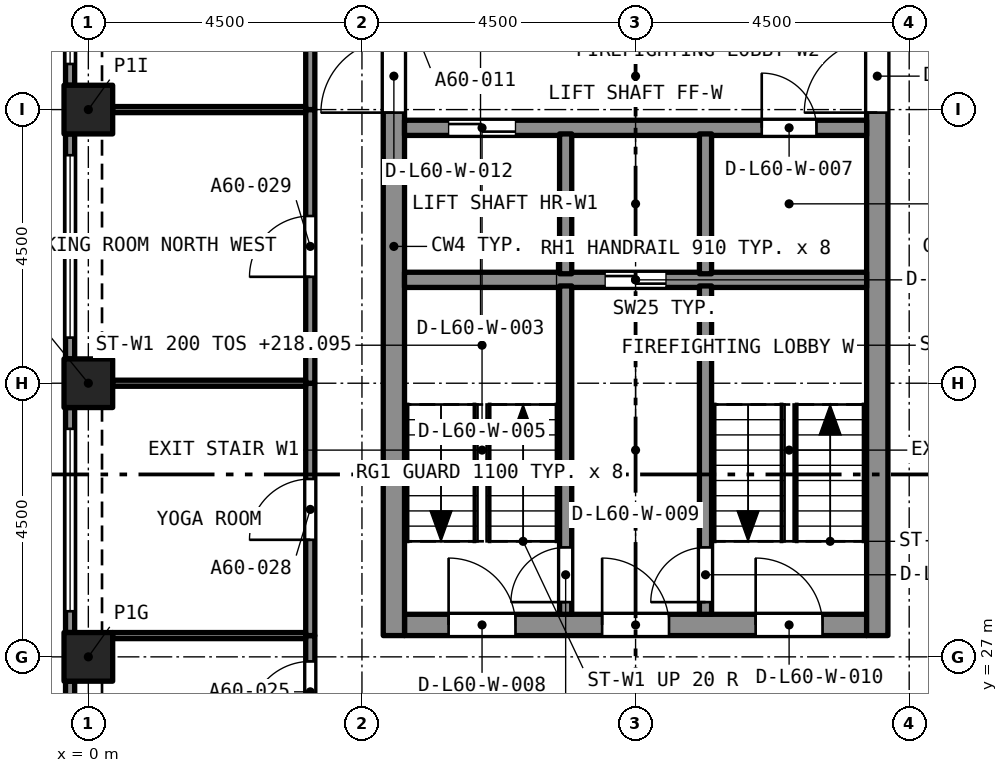
"""IFC4 building model, lengths in metres.
Left out: names, types, materials, properties, quantities, classifications, styles, units other than length and angle.
Written with IfcOpenShell. Run it as: python <this file> out.ifc"""

import sys

from ifc_helpers import new_model, si_unit, direction, frame, frame_2d, origin, origin_2d, place, context, subcontext, project, spatial, rectangle, extrude, element, fill, save


model = new_model("IFC4")
c1 = context("Model", 3, precision=1e-05, world=origin(), true_north=direction((0.0, 1.0)))
c2 = subcontext(c1, "Body", "Model", "MODEL_VIEW")
j1 = project(units=[si_unit("LENGTHUNIT", "METRE"), si_unit("PLANEANGLEUNIT", "RADIAN")], contexts=[c1])
p1 = place(None, origin())
s1 = spatial("IfcSite", under=j1, at=p1, CompositionType="ELEMENT")
p2 = place(p1, origin())
s2 = spatial("IfcBuilding", under=s1, at=p2, CompositionType="ELEMENT")
p3 = place(p2, frame((0.0, 0.0, 216.495)))
s3 = spatial("IfcBuildingStorey", under=s2, at=p3, CompositionType="ELEMENT", Elevation=216.495)
for number, where, z_axis, x_axis in (
    (1, (0.0, 27.0, 0.0), (0.0, 0.0, 1.0), (1.0, 0.0, 0.0)),
    (2, (0.0, 31.5, 0.0), (0.0, 0.0, 1.0), (1.0, 0.0, 0.0)),
    (3, (0.0, 36.0, 0.0), (0.0, 0.0, 1.0), (1.0, 0.0, 0.0)),
):
    element("IfcColumn", number, at=place(p3, frame(where, z_axis=z_axis, x_axis=x_axis)), inside=s3, PredefinedType="COLUMN", context=c2, shape_type="SweptSolid", body=[
        extrude(rectangle(XDim=0.8, YDim=0.8, at=origin_2d()), origin(), (0.0, 0.0, 1.0), 3.2),
    ])
p4 = place(p3, frame((5.2, 27.525, 0.0), z_axis=(0.0, 0.0, 1.0), x_axis=(1.0, 0.0, 0.0)))
e4 = element("IfcWall", 4, at=p4, inside=s3, PredefinedType="SOLIDWALL", context=c2, shape_type="SweptSolid", body=[
    extrude(rectangle(XDim=7.6, YDim=0.35, at=frame_2d((3.8, 0.0))), origin(), (0.0, 0.0, 1.0), 3.2),
])
p5 = place(p4, frame((0.725, 0.0, 0.0)))
e5 = element("IfcOpeningElement", 5, at=p5, cuts=e4, PredefinedType="OPENING", context=c2, shape_type="SweptSolid", body=[
    extrude(rectangle(XDim=1.1, YDim=2.1, at=frame_2d((0.55, 1.05))), frame((0.0, 0.185, 0.0), z_axis=(0.0, -1.0, 0.0), x_axis=(1.0, 0.0, 0.0)), (0.0, 0.0, 1.0), 0.37),
])
p6 = place(p4, frame((3.25, 0.0, 0.0)))
e6 = element("IfcOpeningElement", 6, at=p6, cuts=e4, PredefinedType="OPENING", context=c2, shape_type="SweptSolid", body=[
    extrude(rectangle(XDim=1.1, YDim=2.1, at=frame_2d((0.55, 1.05))), frame((0.0, 0.185, 0.0), z_axis=(0.0, -1.0, 0.0), x_axis=(1.0, 0.0, 0.0)), (0.0, 0.0, 1.0), 0.37),
])
p7 = place(p4, frame((5.775, 0.0, 0.0)))
e7 = element("IfcOpeningElement", 7, at=p7, cuts=e4, PredefinedType="OPENING", context=c2, shape_type="SweptSolid", body=[
    extrude(rectangle(XDim=1.1, YDim=2.1, at=frame_2d((0.55, 1.05))), frame((0.0, 0.185, 0.0), z_axis=(0.0, -1.0, 0.0), x_axis=(1.0, 0.0, 0.0)), (0.0, 0.0, 1.0), 0.37),
])
p8 = place(p3, frame((5.025, 27.35, 0.0), z_axis=(0.0, 0.0, 1.0), x_axis=(0.0, 1.0, 0.0)))
e8 = element("IfcWall", 8, at=p8, inside=s3, PredefinedType="SOLIDWALL", context=c2, shape_type="SweptSolid", body=[
    extrude(rectangle(XDim=12.8, YDim=0.35, at=frame_2d((6.4, 0.0))), origin(), (0.0, 0.0, 1.0), 3.2),
])
p9 = place(p8, frame((8.6, 0.0, 0.0)))
e9 = element("IfcOpeningElement", 9, at=p9, cuts=e8, PredefinedType="OPENING", context=c2, shape_type="SweptSolid", body=[
    extrude(rectangle(XDim=1.2, YDim=2.1, at=frame_2d((0.6, 1.05))), frame((0.0, 0.185, 0.0), z_axis=(0.0, -1.0, 0.0), x_axis=(1.0, 0.0, 0.0)), (0.0, 0.0, 1.0), 0.37),
])
p10 = place(p3, frame((12.975, 27.35, 0.0), z_axis=(0.0, 0.0, 1.0), x_axis=(0.0, 1.0, 0.0)))
e10 = element("IfcWall", 10, at=p10, inside=s3, PredefinedType="SOLIDWALL", context=c2, shape_type="SweptSolid", body=[
    extrude(rectangle(XDim=12.8, YDim=0.35, at=frame_2d((6.4, 0.0))), origin(), (0.0, 0.0, 1.0), 3.2),
])
p11 = place(p10, frame((10.75, 0.0, 0.0)))
e11 = element("IfcOpeningElement", 11, at=p11, cuts=e10, PredefinedType="OPENING", context=c2, shape_type="SweptSolid", body=[
    extrude(rectangle(XDim=1.1, YDim=2.1, at=frame_2d((0.55, 1.05))), frame((0.0, 0.185, 0.0), z_axis=(0.0, -1.0, 0.0), x_axis=(1.0, 0.0, 0.0)), (0.0, 0.0, 1.0), 0.37),
])
p12 = place(p10, frame((8.6, 0.0, 0.0)))
e12 = element("IfcOpeningElement", 12, at=p12, cuts=e10, PredefinedType="OPENING", context=c2, shape_type="SweptSolid", body=[
    extrude(rectangle(XDim=1.2, YDim=2.1, at=frame_2d((0.6, 1.05))), frame((0.0, 0.185, 0.0), z_axis=(0.0, -1.0, 0.0), x_axis=(1.0, 0.0, 0.0)), (0.0, 0.0, 1.0), 0.37),
])
p13 = place(p3, frame((-0.3, 36.4, 0.0), z_axis=(0.0, 0.0, 1.0), x_axis=(0.0, 1.0, 0.0)))
e13 = element("IfcWall", 13, at=p13, inside=s3, PredefinedType="SOLIDWALL", context=c2, shape_type="SweptSolid", body=[
    extrude(rectangle(XDim=3.7, YDim=0.15, at=frame_2d((1.85, 0.0))), origin(), (0.0, 0.0, 1.0), 3.2),
])
p14 = place(p13, frame((0.35, 0.0, 0.45)))
e14 = element("IfcOpeningElement", 14, at=p14, cuts=e13, PredefinedType="OPENING", context=c2, shape_type="SweptSolid", body=[
    extrude(rectangle(XDim=3.0, YDim=1.95, at=frame_2d((1.5, 0.975))), frame((0.0, 0.085, 0.0), z_axis=(0.0, -1.0, 0.0), x_axis=(1.0, 0.0, 0.0)), (0.0, 0.0, 1.0), 0.17),
])
p15 = place(p3, frame((-0.3, 31.9, 0.0), z_axis=(0.0, 0.0, 1.0), x_axis=(0.0, 1.0, 0.0)))
e15 = element("IfcWall", 15, at=p15, inside=s3, PredefinedType="SOLIDWALL", context=c2, shape_type="SweptSolid", body=[
    extrude(rectangle(XDim=3.7, YDim=0.15, at=frame_2d((1.85, 0.0))), origin(), (0.0, 0.0, 1.0), 3.2),
])
p16 = place(p15, frame((0.35, 0.0, 0.45)))
e16 = element("IfcOpeningElement", 16, at=p16, cuts=e15, PredefinedType="OPENING", context=c2, shape_type="SweptSolid", body=[
    extrude(rectangle(XDim=3.0, YDim=1.95, at=frame_2d((1.5, 0.975))), frame((0.0, 0.085, 0.0), z_axis=(0.0, -1.0, 0.0), x_axis=(1.0, 0.0, 0.0)), (0.0, 0.0, 1.0), 0.17),
])
p17 = place(p3, frame((-0.3, 27.4, 0.0), z_axis=(0.0, 0.0, 1.0), x_axis=(0.0, 1.0, 0.0)))
e17 = element("IfcWall", 17, at=p17, inside=s3, PredefinedType="SOLIDWALL", context=c2, shape_type="SweptSolid", body=[
    extrude(rectangle(XDim=3.7, YDim=0.15, at=frame_2d((1.85, 0.0))), origin(), (0.0, 0.0, 1.0), 3.2),
])
p18 = place(p17, frame((0.35, 0.0, 0.45)))
e18 = element("IfcOpeningElement", 18, at=p18, cuts=e17, PredefinedType="OPENING", context=c2, shape_type="SweptSolid", body=[
    extrude(rectangle(XDim=3.0, YDim=1.95, at=frame_2d((1.5, 0.975))), frame((0.0, 0.085, 0.0), z_axis=(0.0, -1.0, 0.0), x_axis=(1.0, 0.0, 0.0)), (0.0, 0.0, 1.0), 0.17),
])
p19 = place(p3, frame((-0.3, 22.9, 0.0), z_axis=(0.0, 0.0, 1.0), x_axis=(0.0, 1.0, 0.0)))
e19 = element("IfcWall", 19, at=p19, inside=s3, PredefinedType="SOLIDWALL", context=c2, shape_type="SweptSolid", body=[
    extrude(rectangle(XDim=3.7, YDim=0.15, at=frame_2d((1.85, 0.0))), origin(), (0.0, 0.0, 1.0), 3.2),
])
p20 = place(p19, frame((0.35, 0.0, 0.45)))
e20 = element("IfcOpeningElement", 20, at=p20, cuts=e19, PredefinedType="OPENING", context=c2, shape_type="SweptSolid", body=[
    extrude(rectangle(XDim=3.0, YDim=1.95, at=frame_2d((1.5, 0.975))), frame((0.0, 0.085, 0.0), z_axis=(0.0, -1.0, 0.0), x_axis=(1.0, 0.0, 0.0)), (0.0, 0.0, 1.0), 0.17),
])
p21 = place(p3, frame((3.65, 25.425, 0.0), z_axis=(0.0, 0.0, 1.0), x_axis=(0.0, 1.0, 0.0)))
e21 = element("IfcWall", 21, at=p21, inside=s3, PredefinedType="PARTITIONING", context=c2, shape_type="SweptSolid", body=[
    extrude(rectangle(XDim=1.925, YDim=0.15, at=frame_2d((0.962, 0.0))), origin(), (0.0, 0.0, 1.0), 2.9),
])
p22 = place(p21, frame((0.5, 0.0, 0.0)))
e22 = element("IfcOpeningElement", 22, at=p22, cuts=e21, PredefinedType="OPENING", context=c2, shape_type="SweptSolid", body=[
    extrude(rectangle(XDim=1.0, YDim=2.1, at=frame_2d((0.5, 1.05))), frame((0.0, 0.085, 0.0), z_axis=(0.0, -1.0, 0.0), x_axis=(1.0, 0.0, 0.0)), (0.0, 0.0, 1.0), 0.17),
])
p23 = place(p3, frame((3.65, 27.35, 0.0), z_axis=(0.0, 0.0, 1.0), x_axis=(0.0, 1.0, 0.0)))
e23 = element("IfcWall", 23, at=p23, inside=s3, PredefinedType="PARTITIONING", context=c2, shape_type="SweptSolid", body=[
    extrude(rectangle(XDim=4.15, YDim=0.15, at=frame_2d((2.075, 0.0))), origin(), (0.0, 0.0, 1.0), 2.9),
])
p24 = place(p23, frame((1.575, 0.0, 0.0)))
e24 = element("IfcOpeningElement", 24, at=p24, cuts=e23, PredefinedType="OPENING", context=c2, shape_type="SweptSolid", body=[
    extrude(rectangle(XDim=1.0, YDim=2.1, at=frame_2d((0.5, 1.05))), frame((0.0, 0.085, 0.0), z_axis=(0.0, -1.0, 0.0), x_axis=(1.0, 0.0, 0.0)), (0.0, 0.0, 1.0), 0.17),
])
p25 = place(p3, frame((3.65, 31.5, 0.0), z_axis=(0.0, 0.0, 1.0), x_axis=(0.0, 1.0, 0.0)))
e25 = element("IfcWall", 25, at=p25, inside=s3, PredefinedType="PARTITIONING", context=c2, shape_type="SweptSolid", body=[
    extrude(rectangle(XDim=4.5, YDim=0.15, at=frame_2d((2.25, 0.0))), origin(), (0.0, 0.0, 1.0), 2.9),
])
p26 = place(p25, frame((1.75, 0.0, 0.0)))
e26 = element("IfcOpeningElement", 26, at=p26, cuts=e25, PredefinedType="OPENING", context=c2, shape_type="SweptSolid", body=[
    extrude(rectangle(XDim=1.0, YDim=2.1, at=frame_2d((0.5, 1.05))), frame((0.0, 0.085, 0.0), z_axis=(0.0, -1.0, 0.0), x_axis=(1.0, 0.0, 0.0)), (0.0, 0.0, 1.0), 0.17),
])
p27 = place(p3, frame((3.65, 36.0, 0.0), z_axis=(0.0, 0.0, 1.0), x_axis=(0.0, 1.0, 0.0)))
e27 = element("IfcWall", 27, at=p27, inside=s3, PredefinedType="PARTITIONING", context=c2, shape_type="SweptSolid", body=[
    extrude(rectangle(XDim=4.025, YDim=0.15, at=frame_2d((2.012, 0.0))), origin(), (0.0, 0.0, 1.0), 2.9),
])
p28 = place(p27, frame((1.575, 0.0, 0.0)))
e28 = element("IfcOpeningElement", 28, at=p28, cuts=e27, PredefinedType="OPENING", context=c2, shape_type="SweptSolid", body=[
    extrude(rectangle(XDim=1.0, YDim=2.1, at=frame_2d((0.5, 1.05))), frame((0.0, 0.085, 0.0), z_axis=(0.0, -1.0, 0.0), x_axis=(1.0, 0.0, 0.0)), (0.0, 0.0, 1.0), 0.17),
])
for number, where, z_axis, x_axis in (
    (29, (0.4, 27.35, 0.0), (0.0, 0.0, 1.0), (1.0, 0.0, 0.0)),
    (30, (0.4, 31.5, 0.0), (0.0, 0.0, 1.0), (1.0, 0.0, 0.0)),
    (31, (0.4, 36.0, 0.0), (0.0, 0.0, 1.0), (1.0, 0.0, 0.0)),
):
    element("IfcWall", number, at=place(p3, frame(where, z_axis=z_axis, x_axis=x_axis)), inside=s3, PredefinedType="PARTITIONING", context=c2, shape_type="SweptSolid", body=[
        extrude(rectangle(XDim=3.175, YDim=0.1, at=frame_2d((1.587, 0.0))), origin(), (0.0, 0.0, 1.0), 2.9),
    ])
p29 = place(p3, frame((5.2, 33.2, 0.0), z_axis=(0.0, 0.0, 1.0), x_axis=(1.0, 0.0, 0.0)))
e32 = element("IfcWall", 32, at=p29, inside=s3, PredefinedType="SOLIDWALL", context=c2, shape_type="SweptSolid", body=[
    extrude(rectangle(XDim=7.6, YDim=0.25, at=frame_2d((3.8, 0.0))), origin(), (0.0, 0.0, 1.0), 2.9),
])
p30 = place(p29, frame((3.3, 0.0, 0.0)))
e33 = element("IfcOpeningElement", 33, at=p30, cuts=e32, PredefinedType="OPENING", context=c2, shape_type="SweptSolid", body=[
    extrude(rectangle(XDim=1.0, YDim=2.1, at=frame_2d((0.5, 1.05))), frame((0.0, 0.135, 0.0), z_axis=(0.0, -1.0, 0.0), x_axis=(1.0, 0.0, 0.0)), (0.0, 0.0, 1.0), 0.27),
])
p31 = place(p3, frame((5.2, 35.7, 0.0), z_axis=(0.0, 0.0, 1.0), x_axis=(1.0, 0.0, 0.0)))
e34 = element("IfcWall", 34, at=p31, inside=s3, PredefinedType="SOLIDWALL", context=c2, shape_type="SweptSolid", body=[
    extrude(rectangle(XDim=7.6, YDim=0.25, at=frame_2d((3.8, 0.0))), origin(), (0.0, 0.0, 1.0), 2.9),
])
p32 = place(p31, frame((0.725, 0.0, 0.0)))
e35 = element("IfcOpeningElement", 35, at=p32, cuts=e34, PredefinedType="OPENING", context=c2, shape_type="SweptSolid", body=[
    extrude(rectangle(XDim=1.1, YDim=2.4, at=frame_2d((0.55, 1.2))), frame((0.0, 0.135, 0.0), z_axis=(0.0, -1.0, 0.0), x_axis=(1.0, 0.0, 0.0)), (0.0, 0.0, 1.0), 0.27),
])
p33 = place(p31, frame((5.875, 0.0, 0.0)))
e36 = element("IfcOpeningElement", 36, at=p33, cuts=e34, PredefinedType="OPENING", context=c2, shape_type="SweptSolid", body=[
    extrude(rectangle(XDim=0.9, YDim=2.1, at=frame_2d((0.45, 1.05))), frame((0.0, 0.135, 0.0), z_axis=(0.0, -1.0, 0.0), x_axis=(1.0, 0.0, 0.0)), (0.0, 0.0, 1.0), 0.27),
])
p34 = place(p3, frame((7.85, 27.7, 0.0), z_axis=(0.0, 0.0, 1.0), x_axis=(0.0, 1.0, 0.0)))
e37 = element("IfcWall", 37, at=p34, inside=s3, PredefinedType="SOLIDWALL", context=c2, shape_type="SweptSolid", body=[
    extrude(rectangle(XDim=5.4, YDim=0.2, at=frame_2d((2.7, 0.0))), origin(), (0.0, 0.0, 1.0), 2.9),
])
p35 = place(p34, frame((0.2, 0.0, 0.0)))
e38 = element("IfcOpeningElement", 38, at=p35, cuts=e37, PredefinedType="OPENING", context=c2, shape_type="SweptSolid", body=[
    extrude(rectangle(XDim=0.9, YDim=2.1, at=frame_2d((0.45, 1.05))), frame((0.0, 0.11, 0.0), z_axis=(0.0, -1.0, 0.0), x_axis=(1.0, 0.0, 0.0)), (0.0, 0.0, 1.0), 0.22),
])
p36 = place(p3, frame((10.15, 27.7, 0.0), z_axis=(0.0, 0.0, 1.0), x_axis=(0.0, 1.0, 0.0)))
e39 = element("IfcWall", 39, at=p36, inside=s3, PredefinedType="SOLIDWALL", context=c2, shape_type="SweptSolid", body=[
    extrude(rectangle(XDim=5.4, YDim=0.2, at=frame_2d((2.7, 0.0))), origin(), (0.0, 0.0, 1.0), 2.9),
])
p37 = place(p36, frame((0.2, 0.0, 0.0)))
e40 = element("IfcOpeningElement", 40, at=p37, cuts=e39, PredefinedType="OPENING", context=c2, shape_type="SweptSolid", body=[
    extrude(rectangle(XDim=0.9, YDim=2.1, at=frame_2d((0.45, 1.05))), frame((0.0, 0.11, 0.0), z_axis=(0.0, -1.0, 0.0), x_axis=(1.0, 0.0, 0.0)), (0.0, 0.0, 1.0), 0.22),
])
for number, where, z_axis, x_axis in (
    (41, (7.85, 33.3, 0.0), (0.0, 0.0, 1.0), (0.0, 1.0, 0.0)),
    (42, (10.15, 33.3, 0.0), (0.0, 0.0, 1.0), (0.0, 1.0, 0.0)),
):
    element("IfcWall", number, at=place(p3, frame(where, z_axis=z_axis, x_axis=x_axis)), inside=s3, PredefinedType="SOLIDWALL", context=c2, shape_type="SweptSolid", body=[
        extrude(rectangle(XDim=2.3, YDim=0.2, at=frame_2d((1.15, 0.0))), origin(), (0.0, 0.0, 1.0), 2.9),
    ])
p38 = place(p14, origin())
e43 = element("IfcWindow", 43, at=p38, inside=s3, PartitioningType="SINGLE_PANEL", PredefinedType="WINDOW", context=c2, shape_type="SweptSolid", body=[
    extrude(rectangle(XDim=3.0, YDim=1.95, at=frame_2d((1.5, 0.975))), frame((0.0, 0.03, 0.0), z_axis=(0.0, -1.0, 0.0), x_axis=(1.0, 0.0, 0.0)), (0.0, 0.0, 1.0), 0.06),
])
fill(e14, e43)
p39 = place(p16, origin())
e44 = element("IfcWindow", 44, at=p39, inside=s3, PartitioningType="SINGLE_PANEL", PredefinedType="WINDOW", context=c2, shape_type="SweptSolid", body=[
    extrude(rectangle(XDim=3.0, YDim=1.95, at=frame_2d((1.5, 0.975))), frame((0.0, 0.03, 0.0), z_axis=(0.0, -1.0, 0.0), x_axis=(1.0, 0.0, 0.0)), (0.0, 0.0, 1.0), 0.06),
])
fill(e16, e44)
p40 = place(p18, origin())
e45 = element("IfcWindow", 45, at=p40, inside=s3, PartitioningType="SINGLE_PANEL", PredefinedType="WINDOW", context=c2, shape_type="SweptSolid", body=[
    extrude(rectangle(XDim=3.0, YDim=1.95, at=frame_2d((1.5, 0.975))), frame((0.0, 0.03, 0.0), z_axis=(0.0, -1.0, 0.0), x_axis=(1.0, 0.0, 0.0)), (0.0, 0.0, 1.0), 0.06),
])
fill(e18, e45)
p41 = place(p22, origin())
e46 = element("IfcDoor", 46, at=p41, inside=s3, OperationType="SINGLE_SWING_RIGHT", PredefinedType="DOOR", context=c2, shape_type="SweptSolid", body=[
    extrude(rectangle(XDim=1.0, YDim=2.1, at=frame_2d((0.5, 1.05))), frame((0.0, 0.025, 0.0), z_axis=(0.0, -1.0, 0.0), x_axis=(1.0, 0.0, 0.0)), (0.0, 0.0, 1.0), 0.05),
])
fill(e22, e46)
p42 = place(p24, origin())
e47 = element("IfcDoor", 47, at=p42, inside=s3, OperationType="SINGLE_SWING_RIGHT", PredefinedType="DOOR", context=c2, shape_type="SweptSolid", body=[
    extrude(rectangle(XDim=1.0, YDim=2.1, at=frame_2d((0.5, 1.05))), frame((0.0, 0.025, 0.0), z_axis=(0.0, -1.0, 0.0), x_axis=(1.0, 0.0, 0.0)), (0.0, 0.0, 1.0), 0.05),
])
fill(e24, e47)
p43 = place(p26, origin())
e48 = element("IfcDoor", 48, at=p43, inside=s3, OperationType="SINGLE_SWING_RIGHT", PredefinedType="DOOR", context=c2, shape_type="SweptSolid", body=[
    extrude(rectangle(XDim=1.0, YDim=2.1, at=frame_2d((0.5, 1.05))), frame((0.0, 0.025, 0.0), z_axis=(0.0, -1.0, 0.0), x_axis=(1.0, 0.0, 0.0)), (0.0, 0.0, 1.0), 0.05),
])
fill(e26, e48)
p44 = place(p35, origin())
e49 = element("IfcDoor", 49, at=p44, inside=s3, OperationType="SINGLE_SWING_LEFT", PredefinedType="DOOR", context=c2, shape_type="SweptSolid", body=[
    extrude(rectangle(XDim=0.9, YDim=2.1, at=frame_2d((0.45, 1.05))), frame((0.0, 0.025, 0.0), z_axis=(0.0, -1.0, 0.0), x_axis=(1.0, 0.0, 0.0)), (0.0, 0.0, 1.0), 0.05),
])
fill(e38, e49)
p45 = place(p37, origin())
e50 = element("IfcDoor", 50, at=p45, inside=s3, OperationType="SINGLE_SWING_LEFT", PredefinedType="DOOR", context=c2, shape_type="SweptSolid", body=[
    extrude(rectangle(XDim=0.9, YDim=2.1, at=frame_2d((0.45, 1.05))), frame((0.0, 0.025, 0.0), z_axis=(0.0, -1.0, 0.0), x_axis=(1.0, 0.0, 0.0)), (0.0, 0.0, 1.0), 0.05),
])
fill(e40, e50)
p46 = place(p32, origin())
e51 = element("IfcDoor", 51, at=p46, inside=s3, OperationType="SLIDING_TO_LEFT", PredefinedType="DOOR", context=c2, shape_type="SweptSolid", body=[
    extrude(rectangle(XDim=1.1, YDim=2.4, at=frame_2d((0.55, 1.2))), frame((0.0, 0.025, 0.0), z_axis=(0.0, -1.0, 0.0), x_axis=(1.0, 0.0, 0.0)), (0.0, 0.0, 1.0), 0.05),
])
fill(e35, e51)
p47 = place(p30, origin())
e52 = element("IfcDoor", 52, at=p47, inside=s3, OperationType="SLIDING_TO_LEFT", PredefinedType="DOOR", context=c2, shape_type="SweptSolid", body=[
    extrude(rectangle(XDim=1.0, YDim=2.1, at=frame_2d((0.5, 1.05))), frame((0.0, 0.025, 0.0), z_axis=(0.0, -1.0, 0.0), x_axis=(1.0, 0.0, 0.0)), (0.0, 0.0, 1.0), 0.05),
])
fill(e33, e52)
p48 = place(p33, origin())
e53 = element("IfcDoor", 53, at=p48, inside=s3, OperationType="SINGLE_SWING_LEFT", PredefinedType="DOOR", context=c2, shape_type="SweptSolid", body=[
    extrude(rectangle(XDim=0.9, YDim=2.1, at=frame_2d((0.45, 1.05))), frame((0.0, 0.025, 0.0), z_axis=(0.0, -1.0, 0.0), x_axis=(1.0, 0.0, 0.0)), (0.0, 0.0, 1.0), 0.05),
])
fill(e36, e53)
p49 = place(p5, origin())
e54 = element("IfcDoor", 54, at=p49, inside=s3, OperationType="SINGLE_SWING_LEFT", PredefinedType="DOOR", context=c2, shape_type="SweptSolid", body=[
    extrude(rectangle(XDim=1.1, YDim=2.1, at=frame_2d((0.55, 1.05))), frame((0.0, 0.025, 0.0), z_axis=(0.0, -1.0, 0.0), x_axis=(1.0, 0.0, 0.0)), (0.0, 0.0, 1.0), 0.05),
])
fill(e5, e54)
p50 = place(p6, origin())
e55 = element("IfcDoor", 55, at=p50, inside=s3, OperationType="SINGLE_SWING_LEFT", PredefinedType="DOOR", context=c2, shape_type="SweptSolid", body=[
    extrude(rectangle(XDim=1.1, YDim=2.1, at=frame_2d((0.55, 1.05))), frame((0.0, 0.025, 0.0), z_axis=(0.0, -1.0, 0.0), x_axis=(1.0, 0.0, 0.0)), (0.0, 0.0, 1.0), 0.05),
])
fill(e6, e55)
p51 = place(p7, origin())
e56 = element("IfcDoor", 56, at=p51, inside=s3, OperationType="SINGLE_SWING_LEFT", PredefinedType="DOOR", context=c2, shape_type="SweptSolid", body=[
    extrude(rectangle(XDim=1.1, YDim=2.1, at=frame_2d((0.55, 1.05))), frame((0.0, 0.025, 0.0), z_axis=(0.0, -1.0, 0.0), x_axis=(1.0, 0.0, 0.0)), (0.0, 0.0, 1.0), 0.05),
])
fill(e7, e56)
p52 = place(p9, origin())
e57 = element("IfcDoor", 57, at=p52, inside=s3, OperationType="SINGLE_SWING_LEFT", PredefinedType="DOOR", context=c2, shape_type="SweptSolid", body=[
    extrude(rectangle(XDim=1.2, YDim=2.1, at=frame_2d((0.6, 1.05))), frame((0.0, 0.025, 0.0), z_axis=(0.0, -1.0, 0.0), x_axis=(1.0, 0.0, 0.0)), (0.0, 0.0, 1.0), 0.05),
])
fill(e9, e57)
p53 = place(p12, origin())
e58 = element("IfcDoor", 58, at=p53, inside=s3, OperationType="SINGLE_SWING_LEFT", PredefinedType="DOOR", context=c2, shape_type="SweptSolid", body=[
    extrude(rectangle(XDim=1.2, YDim=2.1, at=frame_2d((0.6, 1.05))), frame((0.0, 0.025, 0.0), z_axis=(0.0, -1.0, 0.0), x_axis=(1.0, 0.0, 0.0)), (0.0, 0.0, 1.0), 0.05),
])
fill(e12, e58)
save(model, sys.argv[1])
